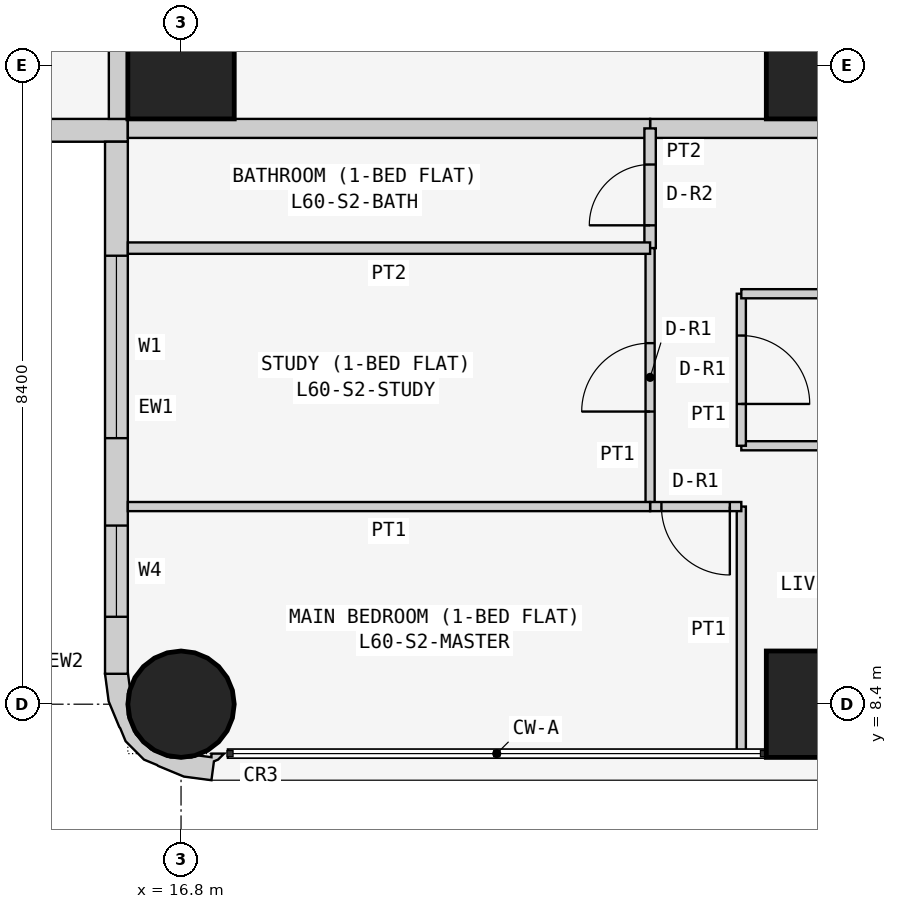
"""IFC4 building model, lengths in metres.
Left out: names, types, materials, properties, quantities, classifications, styles, units other than length and angle.
Written with IfcOpenShell. Run it as: python <this file> out.ifc"""

import sys

from ifc_helpers import new_model, si_unit, direction, frame, frame_2d, origin, origin_2d, place, context, subcontext, project, spatial, polyline, rectangle, circle, outline, extrude, element, fill, save


model = new_model("IFC4")
c1 = context("Model", 3, precision=1e-05, world=origin(), true_north=direction((0.0, 1.0)))
c2 = subcontext(c1, "Body", "Model", "MODEL_VIEW")
j1 = project(units=[si_unit("LENGTHUNIT", "METRE"), si_unit("PLANEANGLEUNIT", "RADIAN")], contexts=[c1])
p1 = place(None, origin())
s1 = spatial("IfcSite", under=j1, at=p1, CompositionType="ELEMENT")
p2 = place(p1, origin())
s2 = spatial("IfcBuilding", under=s1, at=p2, CompositionType="ELEMENT")
p3 = place(p2, frame((0.0, 0.0, 230.1)))
s3 = spatial("IfcBuildingStorey", under=s2, at=p3, CompositionType="ELEMENT", Elevation=230.1)
p4 = place(p3, frame((16.8, 8.4, 0.0), z_axis=(0.0, 0.0, 1.0), x_axis=(1.0, 0.0, 0.0)))
e1 = element("IfcColumn", 1, at=p4, inside=s3, PredefinedType="COLUMN", context=c2, shape_type="SweptSolid", body=[
    extrude(circle(Radius=0.7, at=origin_2d()), origin(), (0.0, 0.0, 1.0), 3.6),
])
for number, where, z_axis, x_axis in (
    (2, (16.8, 16.8, 0.0), (0.0, 0.0, 1.0), (1.0, 0.0, 0.0)),
    (3, (25.2, 8.4, 0.0), (0.0, 0.0, 1.0), (1.0, 0.0, 0.0)),
    (4, (25.2, 16.8, 0.0), (0.0, 0.0, 1.0), (1.0, 0.0, 0.0)),
):
    element("IfcColumn", number, at=place(p3, frame(where, z_axis=z_axis, x_axis=x_axis)), inside=s3, PredefinedType="COLUMN", context=c2, shape_type="SweptSolid", body=[
        extrude(rectangle(XDim=1.4, YDim=1.4, at=origin_2d()), origin(), (0.0, 0.0, 1.0), 3.6),
    ])
p5 = place(p3, frame((0.4, 15.95, 0.0), z_axis=(0.0, 0.0, 1.0), x_axis=(1.0, 0.0, 0.0)))
e5 = element("IfcWall", 5, at=p5, inside=s3, PredefinedType="SOLIDWALL", context=c2, shape_type="SweptSolid", body=[
    extrude(rectangle(XDim=15.7, YDim=0.3, at=frame_2d((7.85, 0.0))), origin(), (0.0, 0.0, 1.0), 3.45),
])
p6 = place(p5, frame((12.4, 0.0, 0.9)))
e6 = element("IfcOpeningElement", 6, at=p6, cuts=e5, PredefinedType="OPENING", context=c2, shape_type="SweptSolid", body=[
    extrude(rectangle(XDim=1.8, YDim=1.5, at=frame_2d((0.9, 0.75))), frame((0.0, 0.16, 0.0), z_axis=(0.0, -1.0, 0.0), x_axis=(1.0, 0.0, 0.0)), (0.0, 0.0, 1.0), 0.32),
])
p7 = place(p5, frame((9.55, 0.0, 1.5)))
e7 = element("IfcOpeningElement", 7, at=p7, cuts=e5, PredefinedType="OPENING", context=c2, shape_type="SweptSolid", body=[
    extrude(rectangle(XDim=0.9, YDim=0.7, at=frame_2d((0.45, 0.35))), frame((0.0, 0.16, 0.0), z_axis=(0.0, -1.0, 0.0), x_axis=(1.0, 0.0, 0.0)), (0.0, 0.0, 1.0), 0.32),
])
p8 = place(p5, frame((5.1, 0.0, 0.9)))
e8 = element("IfcOpeningElement", 8, at=p8, cuts=e5, PredefinedType="OPENING", context=c2, shape_type="SweptSolid", body=[
    extrude(rectangle(XDim=1.8, YDim=1.5, at=frame_2d((0.9, 0.75))), frame((0.0, 0.16, 0.0), z_axis=(0.0, -1.0, 0.0), x_axis=(1.0, 0.0, 0.0)), (0.0, 0.0, 1.0), 0.32),
])
p9 = place(p5, frame((2.0, 0.0, 0.0)))
e9 = element("IfcOpeningElement", 9, at=p9, cuts=e5, PredefinedType="OPENING", context=c2, shape_type="SweptSolid", body=[
    extrude(rectangle(XDim=0.9, YDim=2.4, at=frame_2d((0.45, 1.2))), frame((0.0, 0.16, 0.0), z_axis=(0.0, -1.0, 0.0), x_axis=(1.0, 0.0, 0.0)), (0.0, 0.0, 1.0), 0.32),
])
p10 = place(p5, frame((0.7, 0.0, 0.9)))
e10 = element("IfcOpeningElement", 10, at=p10, cuts=e5, PredefinedType="OPENING", context=c2, shape_type="SweptSolid", body=[
    extrude(rectangle(XDim=1.2, YDim=1.5, at=frame_2d((0.6, 0.75))), frame((0.0, 0.16, 0.0), z_axis=(0.0, -1.0, 0.0), x_axis=(1.0, 0.0, 0.0)), (0.0, 0.0, 1.0), 0.32),
])
p11 = place(p3, frame((15.95, 15.8, 0.0), z_axis=(0.0, 0.0, 1.0), x_axis=(0.0, -1.0, 0.0)))
e11 = element("IfcWall", 11, at=p11, inside=s3, PredefinedType="SOLIDWALL", context=c2, shape_type="SweptSolid", body=[
    extrude(rectangle(XDim=7.0, YDim=0.3, at=frame_2d((3.5, 0.0))), origin(), (0.0, 0.0, 1.0), 3.45),
])
p12 = place(p11, frame((1.5, 0.0, 0.9)))
e12 = element("IfcOpeningElement", 12, at=p12, cuts=e11, PredefinedType="OPENING", context=c2, shape_type="SweptSolid", body=[
    extrude(rectangle(XDim=2.4, YDim=1.5, at=frame_2d((1.2, 0.75))), frame((0.0, 0.16, 0.0), z_axis=(0.0, -1.0, 0.0), x_axis=(1.0, 0.0, 0.0)), (0.0, 0.0, 1.0), 0.32),
])
p13 = place(p11, frame((5.05, 0.0, 0.9)))
e13 = element("IfcOpeningElement", 13, at=p13, cuts=e11, PredefinedType="OPENING", context=c2, shape_type="SweptSolid", body=[
    extrude(rectangle(XDim=1.2, YDim=1.5, at=frame_2d((0.6, 0.75))), frame((0.0, 0.16, 0.0), z_axis=(0.0, -1.0, 0.0), x_axis=(1.0, 0.0, 0.0)), (0.0, 0.0, 1.0), 0.32),
])
p14 = place(p3, frame((16.076, 8.69, 0.0), z_axis=(0.0, 0.0, 1.0), x_axis=(-0.439933741929, -0.898030234854, 0.0)))
e14 = element("IfcWall", 14, at=p14, inside=s3, PredefinedType="SOLIDWALL", context=c2, shape_type="SweptSolid", body=[
    extrude(outline(polyline([(0.664, 1.577), (0.426, 1.497), (0.382, 1.536), (0.276, 1.572), (0.349, 1.423), (0.392, 1.444), (0.453, 1.261), (0.51, 1.211), (0.632, 0.961), (0.65, 0.683), (0.56, 0.419), (0.375, 0.21), (0.125, 0.087), (0.05, 0.082), (-0.127, -0.035), (-0.145, -0.044), (0.022, -0.296), (0.327, -0.094), (0.568, 0.18), (0.578, 0.199), (0.7, 0.337), (0.811, 0.661), (0.799, 0.846), (0.803, 0.866), (0.78, 1.231), (0.664, 1.577)])), origin(), (0.0, 0.0, 1.0), 3.45),
])
p15 = place(p3, frame((29.4, 15.975, 0.0), z_axis=(0.0, 0.0, 1.0), x_axis=(-1.0, 0.0, 0.0)))
e15 = element("IfcWall", 15, at=p15, inside=s3, PredefinedType="PARTITIONING", context=c2, shape_type="SweptSolid", body=[
    extrude(rectangle(XDim=6.429, YDim=0.25, at=frame_2d((3.214, 0.0))), origin(), (0.0, 0.0, 1.0), 3.45),
])
p16 = place(p15, frame((0.5, 0.0, 0.0)))
e16 = element("IfcOpeningElement", 16, at=p16, cuts=e15, PredefinedType="OPENING", context=c2, shape_type="SweptSolid", body=[
    extrude(rectangle(XDim=1.0, YDim=2.1, at=frame_2d((0.5, 1.05))), frame((0.0, 0.135, 0.0), z_axis=(0.0, -1.0, 0.0), x_axis=(1.0, 0.0, 0.0)), (0.0, 0.0, 1.0), 0.27),
])
for number, where, z_axis, x_axis in (
    (17, (22.971, 15.975, 0.0), (0.0, 0.0, 1.0), (-1.0, 0.0, 0.0)),
    (18, (15.975, 16.1, 0.0), (0.0, 0.0, 1.0), (0.0, 1.0, 0.0)),
):
    element("IfcWall", number, at=place(p3, frame(where, z_axis=z_axis, x_axis=x_axis)), inside=s3, PredefinedType="PARTITIONING", context=c2, shape_type="SweptSolid", body=[
        extrude(rectangle(XDim=6.871, YDim=0.25, at=frame_2d((3.436, 0.0))), origin(), (0.0, 0.0, 1.0), 3.45),
    ])
p17 = place(p3, frame((29.4, 11.8, 0.0), z_axis=(0.0, 0.0, 1.0), x_axis=(-1.0, 0.0, 0.0)))
e19 = element("IfcWall", 19, at=p17, inside=s3, PredefinedType="PARTITIONING", context=c2, shape_type="SweptSolid", body=[
    extrude(rectangle(XDim=5.229, YDim=0.12, at=frame_2d((2.615, 0.0))), origin(), (0.0, 0.0, 1.0), 3.45),
])
p18 = place(p3, frame((24.171, 11.8, 0.0), z_axis=(0.0, 0.0, 1.0), x_axis=(0.0, 1.0, 0.0)))
e20 = element("IfcWall", 20, at=p18, inside=s3, PredefinedType="PARTITIONING", context=c2, shape_type="SweptSolid", body=[
    extrude(rectangle(XDim=2.0, YDim=0.12, at=frame_2d((1.0, 0.0))), origin(), (0.0, 0.0, 1.0), 3.45),
])
p19 = place(p18, frame((0.55, 0.0, 0.0)))
e21 = element("IfcOpeningElement", 21, at=p19, cuts=e20, PredefinedType="OPENING", context=c2, shape_type="SweptSolid", body=[
    extrude(rectangle(XDim=0.9, YDim=2.1, at=frame_2d((0.45, 1.05))), frame((0.0, 0.07, 0.0), z_axis=(0.0, -1.0, 0.0), x_axis=(1.0, 0.0, 0.0)), (0.0, 0.0, 1.0), 0.14),
])
p20 = place(p3, frame((24.171, 13.8, 0.0), z_axis=(0.0, 0.0, 1.0), x_axis=(1.0, 0.0, 0.0)))
e22 = element("IfcWall", 22, at=p20, inside=s3, PredefinedType="PARTITIONING", context=c2, shape_type="SweptSolid", body=[
    extrude(rectangle(XDim=5.229, YDim=0.12, at=frame_2d((2.615, 0.0))), origin(), (0.0, 0.0, 1.0), 3.45),
])
p21 = place(p3, frame((22.971, 14.4, 0.0), z_axis=(0.0, 0.0, 1.0), x_axis=(0.0, 1.0, 0.0)))
e23 = element("IfcWall", 23, at=p21, inside=s3, PredefinedType="PARTITIONING", context=c2, shape_type="SweptSolid", body=[
    extrude(rectangle(XDim=1.575, YDim=0.15, at=frame_2d((0.788, 0.0))), origin(), (0.0, 0.0, 1.0), 3.45),
])
p22 = place(p21, frame((0.3, 0.0, 0.0)))
e24 = element("IfcOpeningElement", 24, at=p22, cuts=e23, PredefinedType="OPENING", context=c2, shape_type="SweptSolid", body=[
    extrude(rectangle(XDim=0.8, YDim=2.1, at=frame_2d((0.4, 1.05))), frame((0.0, 0.085, 0.0), z_axis=(0.0, -1.0, 0.0), x_axis=(1.0, 0.0, 0.0)), (0.0, 0.0, 1.0), 0.17),
])
p23 = place(p3, frame((22.971, 11.0, 0.0), z_axis=(0.0, 0.0, 1.0), x_axis=(0.0, 1.0, 0.0)))
e25 = element("IfcWall", 25, at=p23, inside=s3, PredefinedType="PARTITIONING", context=c2, shape_type="SweptSolid", body=[
    extrude(rectangle(XDim=3.4, YDim=0.12, at=frame_2d((1.7, 0.0))), origin(), (0.0, 0.0, 1.0), 3.45),
])
p24 = place(p23, frame((1.25, 0.0, 0.0)))
e26 = element("IfcOpeningElement", 26, at=p24, cuts=e25, PredefinedType="OPENING", context=c2, shape_type="SweptSolid", body=[
    extrude(rectangle(XDim=0.9, YDim=2.1, at=frame_2d((0.45, 1.05))), frame((0.0, 0.07, 0.0), z_axis=(0.0, -1.0, 0.0), x_axis=(1.0, 0.0, 0.0)), (0.0, 0.0, 1.0), 0.14),
])
p25 = place(p3, frame((24.171, 7.75, 0.0), z_axis=(0.0, 0.0, 1.0), x_axis=(0.0, 1.0, 0.0)))
e27 = element("IfcWall", 27, at=p25, inside=s3, PredefinedType="PARTITIONING", context=c2, shape_type="SweptSolid", body=[
    extrude(rectangle(XDim=3.25, YDim=0.12, at=frame_2d((1.625, 0.0))), origin(), (0.0, 0.0, 1.0), 3.45),
])
p26 = place(p3, frame((24.171, 11.0, 0.0), z_axis=(0.0, 0.0, 1.0), x_axis=(-1.0, 0.0, 0.0)))
e28 = element("IfcWall", 28, at=p26, inside=s3, PredefinedType="PARTITIONING", context=c2, shape_type="SweptSolid", body=[
    extrude(rectangle(XDim=1.2, YDim=0.12, at=frame_2d((0.6, 0.0))), origin(), (0.0, 0.0, 1.0), 3.45),
])
p27 = place(p26, frame((0.151, 0.0, 0.0)))
e29 = element("IfcOpeningElement", 29, at=p27, cuts=e28, PredefinedType="OPENING", context=c2, shape_type="SweptSolid", body=[
    extrude(rectangle(XDim=0.9, YDim=2.1, at=frame_2d((0.45, 1.05))), frame((0.0, 0.07, 0.0), z_axis=(0.0, -1.0, 0.0), x_axis=(1.0, 0.0, 0.0)), (0.0, 0.0, 1.0), 0.14),
])
p28 = place(p3, frame((22.971, 14.4, 0.0), z_axis=(0.0, 0.0, 1.0), x_axis=(-1.0, 0.0, 0.0)))
e30 = element("IfcWall", 30, at=p28, inside=s3, PredefinedType="PARTITIONING", context=c2, shape_type="SweptSolid", body=[
    extrude(rectangle(XDim=6.871, YDim=0.15, at=frame_2d((3.436, 0.0))), origin(), (0.0, 0.0, 1.0), 3.45),
])
p29 = place(p3, frame((22.971, 11.0, 0.0), z_axis=(0.0, 0.0, 1.0), x_axis=(-1.0, 0.0, 0.0)))
e31 = element("IfcWall", 31, at=p29, inside=s3, PredefinedType="PARTITIONING", context=c2, shape_type="SweptSolid", body=[
    extrude(rectangle(XDim=6.871, YDim=0.12, at=frame_2d((3.436, 0.0))), origin(), (0.0, 0.0, 1.0), 3.45),
])
p30 = place(p12, origin())
e32 = element("IfcWindow", 32, at=p30, inside=s3, PartitioningType="SINGLE_PANEL", PredefinedType="WINDOW", context=c2, shape_type="SweptSolid", body=[
    extrude(rectangle(XDim=2.4, YDim=1.5, at=frame_2d((1.2, 0.75))), frame((0.0, 0.03, 0.0), z_axis=(0.0, -1.0, 0.0), x_axis=(1.0, 0.0, 0.0)), (0.0, 0.0, 1.0), 0.06),
])
fill(e12, e32)
p31 = place(p13, origin())
e33 = element("IfcWindow", 33, at=p31, inside=s3, PartitioningType="SINGLE_PANEL", PredefinedType="WINDOW", context=c2, shape_type="SweptSolid", body=[
    extrude(rectangle(XDim=1.2, YDim=1.5, at=frame_2d((0.6, 0.75))), frame((0.0, 0.03, 0.0), z_axis=(0.0, -1.0, 0.0), x_axis=(1.0, 0.0, 0.0)), (0.0, 0.0, 1.0), 0.06),
])
fill(e13, e33)
p32 = place(p19, frame((0.9, 0.0, 0.0), z_axis=(0.0, 0.0, 1.0), x_axis=(-1.0, 0.0, 0.0)))
e34 = element("IfcDoor", 34, at=p32, inside=s3, OperationType="SINGLE_SWING_RIGHT", PredefinedType="DOOR", context=c2, shape_type="SweptSolid", body=[
    extrude(rectangle(XDim=0.9, YDim=2.1, at=frame_2d((0.45, 1.05))), frame((0.0, 0.025, 0.0), z_axis=(0.0, -1.0, 0.0), x_axis=(1.0, 0.0, 0.0)), (0.0, 0.0, 1.0), 0.05),
])
fill(e21, e34)
p33 = place(p22, origin())
e35 = element("IfcDoor", 35, at=p33, inside=s3, OperationType="SINGLE_SWING_LEFT", PredefinedType="DOOR", context=c2, shape_type="SweptSolid", body=[
    extrude(rectangle(XDim=0.8, YDim=2.1, at=frame_2d((0.4, 1.05))), frame((0.0, 0.025, 0.0), z_axis=(0.0, -1.0, 0.0), x_axis=(1.0, 0.0, 0.0)), (0.0, 0.0, 1.0), 0.05),
])
fill(e24, e35)
p34 = place(p24, origin())
e36 = element("IfcDoor", 36, at=p34, inside=s3, OperationType="SINGLE_SWING_LEFT", PredefinedType="DOOR", context=c2, shape_type="SweptSolid", body=[
    extrude(rectangle(XDim=0.9, YDim=2.1, at=frame_2d((0.45, 1.05))), frame((0.0, 0.025, 0.0), z_axis=(0.0, -1.0, 0.0), x_axis=(1.0, 0.0, 0.0)), (0.0, 0.0, 1.0), 0.05),
])
fill(e26, e36)
p35 = place(p27, origin())
e37 = element("IfcDoor", 37, at=p35, inside=s3, OperationType="SINGLE_SWING_LEFT", PredefinedType="DOOR", context=c2, shape_type="SweptSolid", body=[
    extrude(rectangle(XDim=0.9, YDim=2.1, at=frame_2d((0.45, 1.05))), frame((0.0, 0.025, 0.0), z_axis=(0.0, -1.0, 0.0), x_axis=(1.0, 0.0, 0.0)), (0.0, 0.0, 1.0), 0.05),
])
fill(e29, e37)
save(model, sys.argv[1])
